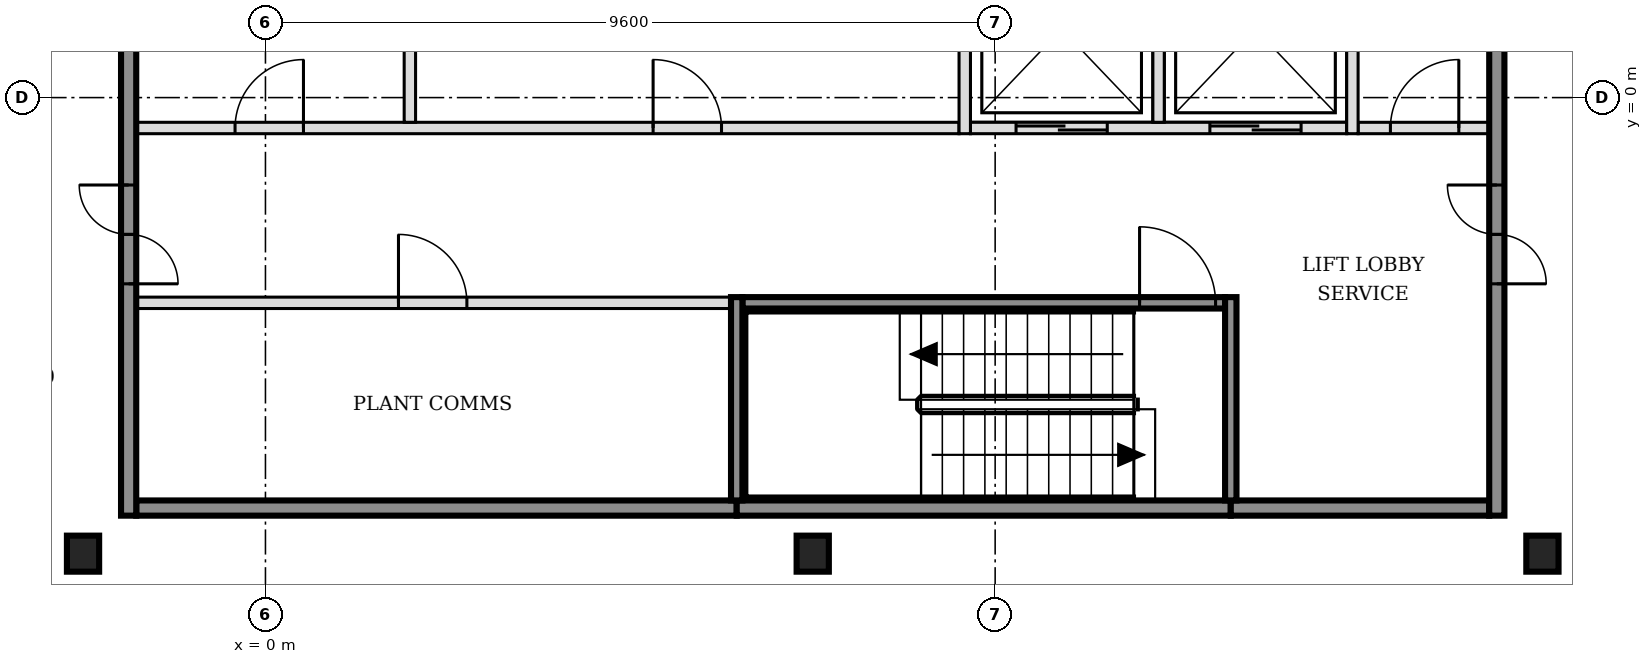
"""IFC4 building model, lengths in metres.
Left out: names, types, materials, properties, quantities, classifications, styles, units other than length and angle.
Written with IfcOpenShell. Run it as: python <this file> out.ifc"""

import sys

from ifc_helpers import new_model, si_unit, direction, frame, frame_2d, origin, origin_2d, place, context, subcontext, project, spatial, rectangle, i_section, extrude, element, fill, save


model = new_model("IFC4")
c1 = context("Model", 3, precision=1e-05, world=origin(), true_north=direction((0.0, 1.0)))
c2 = subcontext(c1, "Body", "Model", "MODEL_VIEW")
j1 = project(units=[si_unit("LENGTHUNIT", "METRE"), si_unit("PLANEANGLEUNIT", "RADIAN")], contexts=[c1])
p1 = place(None, origin())
s1 = spatial("IfcSite", under=j1, at=p1, CompositionType="ELEMENT")
p2 = place(p1, origin())
s2 = spatial("IfcBuilding", under=s1, at=p2, CompositionType="ELEMENT")
p3 = place(p2, frame((0.0, 0.0, 139.8)))
s3 = spatial("IfcBuildingStorey", under=s2, at=p3, CompositionType="ELEMENT", Elevation=139.8)
for number, where, z_axis, x_axis in (
    (1, (-2.4, -6.0, -0.15), (0.0, 0.0, 1.0), (1.0, 0.0, 0.0)),
    (2, (7.2, -6.0, -0.15), (0.0, 0.0, 1.0), (1.0, 0.0, 0.0)),
    (3, (16.8, -6.0, -0.15), (0.0, 0.0, 1.0), (1.0, 0.0, 0.0)),
):
    element("IfcColumn", number, at=place(p3, frame(where, z_axis=z_axis, x_axis=x_axis)), inside=s3, PredefinedType="COLUMN", context=c2, shape_type="SweptSolid", body=[
        extrude(i_section(OverallWidth=0.424, OverallDepth=0.474, WebThickness=0.048, FlangeThickness=0.077, FilletRadius=0.015, at=origin_2d()), origin(), (0.0, 0.0, 1.0), 3.6),
    ])
p4 = place(p3, frame((-1.7, -5.4, 0.0), z_axis=(0.0, 0.0, 1.0), x_axis=(1.0, 0.0, 0.0)))
e4 = element("IfcWall", 4, at=p4, inside=s3, PredefinedType="SOLIDWALL", context=c2, shape_type="SweptSolid", body=[
    extrude(rectangle(XDim=7.9, YDim=0.2, at=frame_2d((3.95, 0.0))), origin(), (0.0, 0.0, 1.0), 3.45),
])
p5 = place(p3, frame((6.2, -5.4, 0.0), z_axis=(0.0, 0.0, 1.0), x_axis=(1.0, 0.0, 0.0)))
e5 = element("IfcWall", 5, at=p5, inside=s3, PredefinedType="SOLIDWALL", context=c2, shape_type="SweptSolid", body=[
    extrude(rectangle(XDim=6.5, YDim=0.2, at=frame_2d((3.25, 0.0))), origin(), (0.0, 0.0, 1.0), 3.45),
])
p6 = place(p3, frame((12.7, -5.4, 0.0), z_axis=(0.0, 0.0, 1.0), x_axis=(1.0, 0.0, 0.0)))
e6 = element("IfcWall", 6, at=p6, inside=s3, PredefinedType="SOLIDWALL", context=c2, shape_type="SweptSolid", body=[
    extrude(rectangle(XDim=3.4, YDim=0.2, at=frame_2d((1.7, 0.0))), origin(), (0.0, 0.0, 1.0), 3.45),
])
p7 = place(p3, frame((-1.7, -2.7, 0.0), z_axis=(0.0, 0.0, 1.0), x_axis=(1.0, 0.0, 0.0)))
e7 = element("IfcWall", 7, at=p7, inside=s3, PredefinedType="PARTITIONING", context=c2, shape_type="SweptSolid", body=[
    extrude(rectangle(XDim=7.825, YDim=0.15, at=frame_2d((3.913, 0.0))), origin(), (0.0, 0.0, 1.0), 3.45),
])
p8 = place(p7, frame((3.45, 0.0, 0.0)))
e8 = element("IfcOpeningElement", 8, at=p8, cuts=e7, PredefinedType="OPENING", context=c2, shape_type="SweptSolid", body=[
    extrude(rectangle(XDim=0.9, YDim=2.1, at=frame_2d((0.45, 1.05))), frame((0.0, 0.085, 0.0), z_axis=(0.0, -1.0, 0.0), x_axis=(1.0, 0.0, 0.0)), (0.0, 0.0, 1.0), 0.17),
])
p9 = place(p3, frame((6.275, -2.7, 0.0), z_axis=(0.0, 0.0, 1.0), x_axis=(1.0, 0.0, 0.0)))
e9 = element("IfcWall", 9, at=p9, inside=s3, PredefinedType="SOLIDWALL", context=c2, shape_type="SweptSolid", body=[
    extrude(rectangle(XDim=6.35, YDim=0.15, at=frame_2d((3.175, 0.0))), origin(), (0.0, 0.0, 1.0), 3.45),
])
p10 = place(p9, frame((5.225, 0.0, 0.0)))
e10 = element("IfcOpeningElement", 10, at=p10, cuts=e9, PredefinedType="OPENING", context=c2, shape_type="SweptSolid", body=[
    extrude(rectangle(XDim=1.0, YDim=2.1, at=frame_2d((0.5, 1.05))), frame((0.0, 0.085, 0.0), z_axis=(0.0, -1.0, 0.0), x_axis=(1.0, 0.0, 0.0)), (0.0, 0.0, 1.0), 0.17),
])
p11 = place(p3, frame((-1.7, -0.4, 0.0), z_axis=(0.0, 0.0, 1.0), x_axis=(1.0, 0.0, 0.0)))
e11 = element("IfcWall", 11, at=p11, inside=s3, PredefinedType="PARTITIONING", context=c2, shape_type="SweptSolid", body=[
    extrude(rectangle(XDim=10.825, YDim=0.15, at=frame_2d((5.413, 0.0))), origin(), (0.0, 0.0, 1.0), 3.45),
])
p12 = place(p11, frame((1.3, 0.0, 0.0)))
e12 = element("IfcOpeningElement", 12, at=p12, cuts=e11, PredefinedType="OPENING", context=c2, shape_type="SweptSolid", body=[
    extrude(rectangle(XDim=0.9, YDim=2.1, at=frame_2d((0.45, 1.05))), frame((0.0, 0.085, 0.0), z_axis=(0.0, -1.0, 0.0), x_axis=(1.0, 0.0, 0.0)), (0.0, 0.0, 1.0), 0.17),
])
p13 = place(p11, frame((6.8, 0.0, 0.0)))
e13 = element("IfcOpeningElement", 13, at=p13, cuts=e11, PredefinedType="OPENING", context=c2, shape_type="SweptSolid", body=[
    extrude(rectangle(XDim=0.9, YDim=2.1, at=frame_2d((0.45, 1.05))), frame((0.0, 0.085, 0.0), z_axis=(0.0, -1.0, 0.0), x_axis=(1.0, 0.0, 0.0)), (0.0, 0.0, 1.0), 0.17),
])
p14 = place(p3, frame((9.275, -0.4, 0.0), z_axis=(0.0, 0.0, 1.0), x_axis=(1.0, 0.0, 0.0)))
e14 = element("IfcWall", 14, at=p14, inside=s3, PredefinedType="SOLIDWALL", context=c2, shape_type="SweptSolid", body=[
    extrude(rectangle(XDim=4.95, YDim=0.15, at=frame_2d((2.475, 0.0))), origin(), (0.0, 0.0, 1.0), 3.45),
])
p15 = place(p14, frame((0.6, 0.0, 0.0)))
e15 = element("IfcOpeningElement", 15, at=p15, cuts=e14, PredefinedType="OPENING", context=c2, shape_type="SweptSolid", body=[
    extrude(rectangle(XDim=1.2, YDim=2.1, at=frame_2d((0.6, 1.05))), frame((0.0, 0.085, 0.0), z_axis=(0.0, -1.0, 0.0), x_axis=(1.0, 0.0, 0.0)), (0.0, 0.0, 1.0), 0.17),
])
p16 = place(p14, frame((3.15, 0.0, 0.0)))
e16 = element("IfcOpeningElement", 16, at=p16, cuts=e14, PredefinedType="OPENING", context=c2, shape_type="SweptSolid", body=[
    extrude(rectangle(XDim=1.2, YDim=2.1, at=frame_2d((0.6, 1.05))), frame((0.0, 0.085, 0.0), z_axis=(0.0, -1.0, 0.0), x_axis=(1.0, 0.0, 0.0)), (0.0, 0.0, 1.0), 0.17),
])
p17 = place(p3, frame((14.375, -0.4, 0.0), z_axis=(0.0, 0.0, 1.0), x_axis=(1.0, 0.0, 0.0)))
e17 = element("IfcWall", 17, at=p17, inside=s3, PredefinedType="PARTITIONING", context=c2, shape_type="SweptSolid", body=[
    extrude(rectangle(XDim=1.725, YDim=0.15, at=frame_2d((0.863, 0.0))), origin(), (0.0, 0.0, 1.0), 3.45),
])
p18 = place(p17, frame((0.425, 0.0, 0.0)))
e18 = element("IfcOpeningElement", 18, at=p18, cuts=e17, PredefinedType="OPENING", context=c2, shape_type="SweptSolid", body=[
    extrude(rectangle(XDim=0.9, YDim=2.1, at=frame_2d((0.45, 1.05))), frame((0.0, 0.085, 0.0), z_axis=(0.0, -1.0, 0.0), x_axis=(1.0, 0.0, 0.0)), (0.0, 0.0, 1.0), 0.17),
])
p19 = place(p3, frame((-1.8, -5.5, 0.0), z_axis=(0.0, 0.0, 1.0), x_axis=(0.0, 1.0, 0.0)))
e19 = element("IfcWall", 19, at=p19, inside=s3, PredefinedType="SOLIDWALL", context=c2, shape_type="SweptSolid", body=[
    extrude(rectangle(XDim=15.8, YDim=0.2, at=frame_2d((7.9, 0.0))), origin(), (0.0, 0.0, 1.0), 3.45),
])
p20 = place(p19, frame((3.05, 0.0, 0.0)))
e20 = element("IfcOpeningElement", 20, at=p20, cuts=e19, PredefinedType="OPENING", context=c2, shape_type="SweptSolid", body=[
    extrude(rectangle(XDim=1.3, YDim=2.1, at=frame_2d((0.65, 1.05))), frame((0.0, 0.11, 0.0), z_axis=(0.0, -1.0, 0.0), x_axis=(1.0, 0.0, 0.0)), (0.0, 0.0, 1.0), 0.22),
])
p21 = place(p19, frame((11.45, 0.0, 0.0)))
e21 = element("IfcOpeningElement", 21, at=p21, cuts=e19, PredefinedType="OPENING", context=c2, shape_type="SweptSolid", body=[
    extrude(rectangle(XDim=1.3, YDim=2.1, at=frame_2d((0.65, 1.05))), frame((0.0, 0.11, 0.0), z_axis=(0.0, -1.0, 0.0), x_axis=(1.0, 0.0, 0.0)), (0.0, 0.0, 1.0), 0.22),
])
p22 = place(p3, frame((1.9, -0.325, 0.0), z_axis=(0.0, 0.0, 1.0), x_axis=(0.0, 1.0, 0.0)))
e22 = element("IfcWall", 22, at=p22, inside=s3, PredefinedType="PARTITIONING", context=c2, shape_type="SweptSolid", body=[
    extrude(rectangle(XDim=2.45, YDim=0.15, at=frame_2d((1.225, 0.0))), origin(), (0.0, 0.0, 1.0), 3.45),
])
p23 = place(p3, frame((6.2, -5.3, 0.0), z_axis=(0.0, 0.0, 1.0), x_axis=(0.0, 1.0, 0.0)))
e23 = element("IfcWall", 23, at=p23, inside=s3, PredefinedType="SOLIDWALL", context=c2, shape_type="SweptSolid", body=[
    extrude(rectangle(XDim=2.675, YDim=0.15, at=frame_2d((1.337, 0.0))), origin(), (0.0, 0.0, 1.0), 3.45),
])
p24 = place(p3, frame((9.2, -0.475, 0.0), z_axis=(0.0, 0.0, 1.0), x_axis=(0.0, 1.0, 0.0)))
e24 = element("IfcWall", 24, at=p24, inside=s3, PredefinedType="SOLIDWALL", context=c2, shape_type="SweptSolid", body=[
    extrude(rectangle(XDim=2.6, YDim=0.15, at=frame_2d((1.3, 0.0))), origin(), (0.0, 0.0, 1.0), 3.45),
])
p25 = place(p3, frame((11.75, -0.325, 0.0), z_axis=(0.0, 0.0, 1.0), x_axis=(0.0, 1.0, 0.0)))
e25 = element("IfcWall", 25, at=p25, inside=s3, PredefinedType="SOLIDWALL", context=c2, shape_type="SweptSolid", body=[
    extrude(rectangle(XDim=2.45, YDim=0.15, at=frame_2d((1.225, 0.0))), origin(), (0.0, 0.0, 1.0), 3.45),
])
p26 = place(p3, frame((12.7, -5.3, 0.0), z_axis=(0.0, 0.0, 1.0), x_axis=(0.0, 1.0, 0.0)))
e26 = element("IfcWall", 26, at=p26, inside=s3, PredefinedType="SOLIDWALL", context=c2, shape_type="SweptSolid", body=[
    extrude(rectangle(XDim=2.675, YDim=0.15, at=frame_2d((1.337, 0.0))), origin(), (0.0, 0.0, 1.0), 3.45),
])
p27 = place(p3, frame((14.3, -0.475, 0.0), z_axis=(0.0, 0.0, 1.0), x_axis=(0.0, 1.0, 0.0)))
e27 = element("IfcWall", 27, at=p27, inside=s3, PredefinedType="SOLIDWALL", context=c2, shape_type="SweptSolid", body=[
    extrude(rectangle(XDim=2.75, YDim=0.15, at=frame_2d((1.375, 0.0))), origin(), (0.0, 0.0, 1.0), 3.45),
])
p28 = place(p3, frame((16.2, -5.5, 0.0), z_axis=(0.0, 0.0, 1.0), x_axis=(0.0, 1.0, 0.0)))
e28 = element("IfcWall", 28, at=p28, inside=s3, PredefinedType="SOLIDWALL", context=c2, shape_type="SweptSolid", body=[
    extrude(rectangle(XDim=15.8, YDim=0.2, at=frame_2d((7.9, 0.0))), origin(), (0.0, 0.0, 1.0), 3.45),
])
p29 = place(p28, frame((3.05, 0.0, 0.0)))
e29 = element("IfcOpeningElement", 29, at=p29, cuts=e28, PredefinedType="OPENING", context=c2, shape_type="SweptSolid", body=[
    extrude(rectangle(XDim=1.3, YDim=2.1, at=frame_2d((0.65, 1.05))), frame((0.0, 0.11, 0.0), z_axis=(0.0, -1.0, 0.0), x_axis=(1.0, 0.0, 0.0)), (0.0, 0.0, 1.0), 0.22),
])
p30 = place(p28, frame((11.45, 0.0, 0.0)))
e30 = element("IfcOpeningElement", 30, at=p30, cuts=e28, PredefinedType="OPENING", context=c2, shape_type="SweptSolid", body=[
    extrude(rectangle(XDim=1.3, YDim=2.1, at=frame_2d((0.65, 1.05))), frame((0.0, 0.11, 0.0), z_axis=(0.0, -1.0, 0.0), x_axis=(1.0, 0.0, 0.0)), (0.0, 0.0, 1.0), 0.22),
])
p31 = place(p15, origin())
e31 = element("IfcDoor", 31, at=p31, inside=s3, OperationType="DOUBLE_DOOR_SLIDING", PredefinedType="DOOR", context=c2, shape_type="SweptSolid", body=[
    extrude(rectangle(XDim=1.2, YDim=2.1, at=frame_2d((0.6, 1.05))), frame((0.0, 0.025, 0.0), z_axis=(0.0, -1.0, 0.0), x_axis=(1.0, 0.0, 0.0)), (0.0, 0.0, 1.0), 0.05),
])
fill(e15, e31)
p32 = place(p16, origin())
e32 = element("IfcDoor", 32, at=p32, inside=s3, OperationType="DOUBLE_DOOR_SLIDING", PredefinedType="DOOR", context=c2, shape_type="SweptSolid", body=[
    extrude(rectangle(XDim=1.2, YDim=2.1, at=frame_2d((0.6, 1.05))), frame((0.0, 0.025, 0.0), z_axis=(0.0, -1.0, 0.0), x_axis=(1.0, 0.0, 0.0)), (0.0, 0.0, 1.0), 0.05),
])
fill(e16, e32)
p33 = place(p10, origin())
e33 = element("IfcDoor", 33, at=p33, inside=s3, OperationType="SINGLE_SWING_LEFT", PredefinedType="DOOR", context=c2, shape_type="SweptSolid", body=[
    extrude(rectangle(XDim=1.0, YDim=2.1, at=frame_2d((0.5, 1.05))), frame((0.0, 0.025, 0.0), z_axis=(0.0, -1.0, 0.0), x_axis=(1.0, 0.0, 0.0)), (0.0, 0.0, 1.0), 0.05),
])
fill(e10, e33)
p34 = place(p20, origin())
e34 = element("IfcDoor", 34, at=p34, inside=s3, OperationType="DOUBLE_DOOR_SINGLE_SWING", PredefinedType="DOOR", context=c2, shape_type="SweptSolid", body=[
    extrude(rectangle(XDim=1.3, YDim=2.1, at=frame_2d((0.65, 1.05))), frame((0.0, 0.025, 0.0), z_axis=(0.0, -1.0, 0.0), x_axis=(1.0, 0.0, 0.0)), (0.0, 0.0, 1.0), 0.05),
])
fill(e20, e34)
p35 = place(p29, origin())
e35 = element("IfcDoor", 35, at=p35, inside=s3, OperationType="DOUBLE_DOOR_SINGLE_SWING", PredefinedType="DOOR", context=c2, shape_type="SweptSolid", body=[
    extrude(rectangle(XDim=1.3, YDim=2.1, at=frame_2d((0.65, 1.05))), frame((0.0, 0.025, 0.0), z_axis=(0.0, -1.0, 0.0), x_axis=(1.0, 0.0, 0.0)), (0.0, 0.0, 1.0), 0.05),
])
fill(e29, e35)
p36 = place(p18, origin())
e36 = element("IfcDoor", 36, at=p36, inside=s3, OperationType="SINGLE_SWING_RIGHT", PredefinedType="DOOR", context=c2, shape_type="SweptSolid", body=[
    extrude(rectangle(XDim=0.9, YDim=2.1, at=frame_2d((0.45, 1.05))), frame((0.0, 0.025, 0.0), z_axis=(0.0, -1.0, 0.0), x_axis=(1.0, 0.0, 0.0)), (0.0, 0.0, 1.0), 0.05),
])
fill(e18, e36)
p37 = place(p8, origin())
e37 = element("IfcDoor", 37, at=p37, inside=s3, OperationType="SINGLE_SWING_LEFT", PredefinedType="DOOR", context=c2, shape_type="SweptSolid", body=[
    extrude(rectangle(XDim=0.9, YDim=2.1, at=frame_2d((0.45, 1.05))), frame((0.0, 0.025, 0.0), z_axis=(0.0, -1.0, 0.0), x_axis=(1.0, 0.0, 0.0)), (0.0, 0.0, 1.0), 0.05),
])
fill(e8, e37)
p38 = place(p12, origin())
e38 = element("IfcDoor", 38, at=p38, inside=s3, OperationType="SINGLE_SWING_RIGHT", PredefinedType="DOOR", context=c2, shape_type="SweptSolid", body=[
    extrude(rectangle(XDim=0.9, YDim=2.1, at=frame_2d((0.45, 1.05))), frame((0.0, 0.025, 0.0), z_axis=(0.0, -1.0, 0.0), x_axis=(1.0, 0.0, 0.0)), (0.0, 0.0, 1.0), 0.05),
])
fill(e12, e38)
p39 = place(p13, origin())
e39 = element("IfcDoor", 39, at=p39, inside=s3, OperationType="SINGLE_SWING_LEFT", PredefinedType="DOOR", context=c2, shape_type="SweptSolid", body=[
    extrude(rectangle(XDim=0.9, YDim=2.1, at=frame_2d((0.45, 1.05))), frame((0.0, 0.025, 0.0), z_axis=(0.0, -1.0, 0.0), x_axis=(1.0, 0.0, 0.0)), (0.0, 0.0, 1.0), 0.05),
])
fill(e13, e39)
save(model, sys.argv[1])
